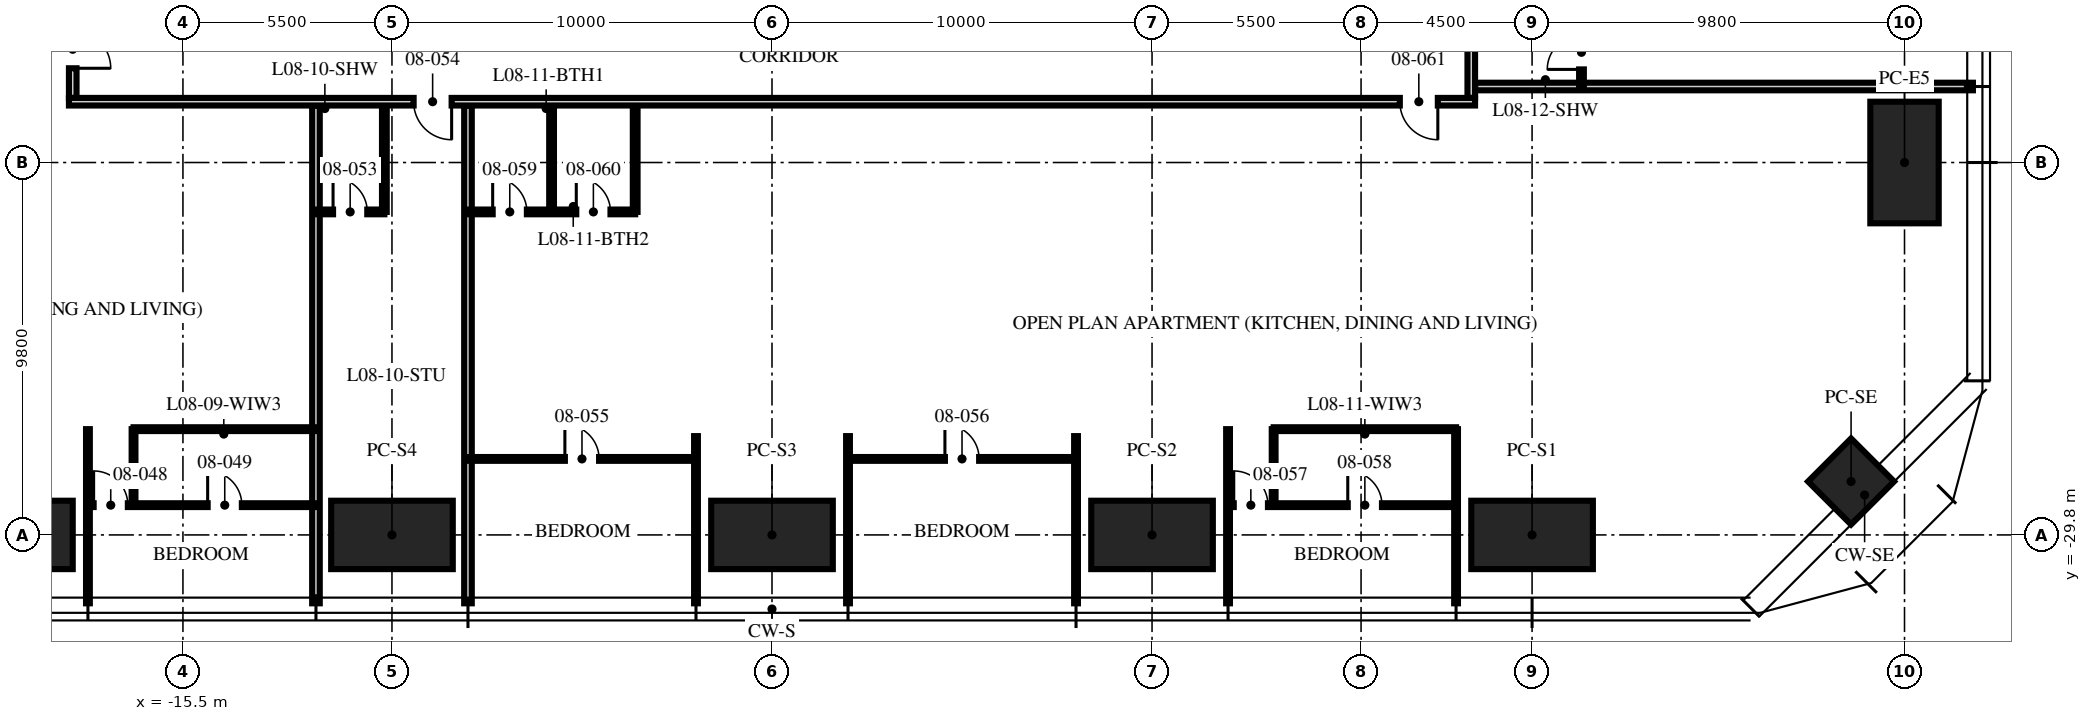
"""IFC4 building model, lengths in metres.
Left out: names, types, materials, properties, quantities, classifications, styles, units other than length and angle.
Written with IfcOpenShell. Run it as: python <this file> out.ifc"""

import sys

from ifc_helpers import new_model, si_unit, direction, frame, frame_2d, origin, origin_2d, place, context, subcontext, project, spatial, rectangle, hollow_rectangle, extrude, element, fill, save


model = new_model("IFC4")
c1 = context("Model", 3, precision=1e-05, world=origin(), true_north=direction((0.0, 1.0)))
c2 = subcontext(c1, "Body", "Model", "MODEL_VIEW")
j1 = project(units=[si_unit("LENGTHUNIT", "METRE"), si_unit("PLANEANGLEUNIT", "RADIAN")], contexts=[c1])
p1 = place(None, origin())
s1 = spatial("IfcSite", under=j1, at=p1, CompositionType="ELEMENT")
p2 = place(p1, origin())
s2 = spatial("IfcBuilding", under=s1, at=p2, CompositionType="ELEMENT")
p3 = place(p2, frame((0.0, 0.0, 36.0)))
s3 = spatial("IfcBuildingStorey", under=s2, at=p3, CompositionType="ELEMENT", Elevation=36.0)
for number, where, z_axis, x_axis in (
    (1, (29.8, -20.0, 0.0), (0.0, 0.0, 1.0), (0.0, 1.0, 0.0)),
    (2, (20.0, -29.8, 0.0), (0.0, 0.0, 1.0), (1.0, 0.0, 0.0)),
    (3, (10.0, -29.8, 0.0), (0.0, 0.0, 1.0), (1.0, 0.0, 0.0)),
    (4, (0.0, -29.8, 0.0), (0.0, 0.0, 1.0), (1.0, 0.0, 0.0)),
    (5, (-10.0, -29.8, 0.0), (0.0, 0.0, 1.0), (1.0, 0.0, 0.0)),
    (6, (-20.0, -29.8, 0.0), (0.0, 0.0, 1.0), (1.0, 0.0, 0.0)),
):
    element("IfcColumn", number, at=place(p3, frame(where, z_axis=z_axis, x_axis=x_axis)), inside=s3, PredefinedType="COLUMN", context=c2, shape_type="SweptSolid", body=[
        extrude(hollow_rectangle(XDim=3.2, YDim=1.8, WallThickness=0.2, at=origin_2d()), origin(), (0.0, 0.0, 1.0), 3.75),
    ])
p4 = place(p3, frame((28.394, -28.394, 0.0), z_axis=(0.0, 0.0, 1.0), x_axis=(0.707106781187, 0.707106781187, 0.0)))
e7 = element("IfcColumn", 7, at=p4, inside=s3, PredefinedType="COLUMN", context=c2, shape_type="SweptSolid", body=[
    extrude(hollow_rectangle(XDim=1.6, YDim=1.6, WallThickness=0.1, at=origin_2d()), origin(), (0.0, 0.0, 1.0), 3.75),
])
p5 = place(p3, frame((-18.0, -27.017, 0.0), z_axis=(0.0, 0.0, 1.0), x_axis=(0.0, -1.0, 0.0)))
e8 = element("IfcWall", 8, at=p5, inside=s3, PredefinedType="PARTITIONING", context=c2, shape_type="SweptSolid", body=[
    extrude(rectangle(XDim=4.583, YDim=0.1, at=frame_2d((2.292, 0.0))), origin(), (0.0, 0.0, 1.0), 2.71),
])
for number, where, z_axis, x_axis in (
    (9, (-12.0, -18.5, 0.0), (0.0, 0.0, 1.0), (0.0, -1.0, 0.0)),
    (10, (-8.0, -18.5, 0.0), (0.0, 0.0, 1.0), (0.0, -1.0, 0.0)),
):
    element("IfcWall", number, at=place(p3, frame(where, z_axis=z_axis, x_axis=x_axis)), inside=s3, PredefinedType="PARTITIONING", context=c2, shape_type="SweptSolid", body=[
        extrude(rectangle(XDim=13.1, YDim=0.2, at=frame_2d((6.55, 0.0))), origin(), (0.0, 0.0, 1.0), 2.71),
    ])
for number, where, z_axis, x_axis in (
    (11, (-2.0, -27.2, 0.0), (0.0, 0.0, 1.0), (0.0, -1.0, 0.0)),
    (12, (2.0, -27.2, 0.0), (0.0, 0.0, 1.0), (0.0, -1.0, 0.0)),
    (13, (8.0, -27.2, 0.0), (0.0, 0.0, 1.0), (0.0, -1.0, 0.0)),
):
    element("IfcWall", number, at=place(p3, frame(where, z_axis=z_axis, x_axis=x_axis)), inside=s3, PredefinedType="PARTITIONING", context=c2, shape_type="SweptSolid", body=[
        extrude(rectangle(XDim=4.4, YDim=0.1, at=frame_2d((2.2, 0.0))), origin(), (0.0, 0.0, 1.0), 2.71),
    ])
for number, where, z_axis, x_axis in (
    (14, (12.0, -27.017, 0.0), (0.0, 0.0, 1.0), (0.0, -1.0, 0.0)),
    (15, (18.0, -27.017, 0.0), (0.0, 0.0, 1.0), (0.0, -1.0, 0.0)),
):
    element("IfcWall", number, at=place(p3, frame(where, z_axis=z_axis, x_axis=x_axis)), inside=s3, PredefinedType="PARTITIONING", context=c2, shape_type="SweptSolid", body=[
        extrude(rectangle(XDim=4.583, YDim=0.1, at=frame_2d((2.292, 0.0))), origin(), (0.0, 0.0, 1.0), 2.71),
    ])
p6 = place(p3, frame((18.5, -18.0, 0.0), z_axis=(0.0, 0.0, 1.0), x_axis=(1.0, 0.0, 0.0)))
e16 = element("IfcWall", 16, at=p6, inside=s3, PredefinedType="PARTITIONING", context=c2, shape_type="SweptSolid", body=[
    extrude(rectangle(XDim=13.1, YDim=0.2, at=frame_2d((6.55, 0.0))), origin(), (0.0, 0.0, 1.0), 2.3),
])
p7 = place(p3, frame((-18.0, -29.017, 0.0), z_axis=(0.0, 0.0, 1.0), x_axis=(1.0, 0.0, 0.0)))
e17 = element("IfcWall", 17, at=p7, inside=s3, PredefinedType="PARTITIONING", context=c2, shape_type="SweptSolid", body=[
    extrude(rectangle(XDim=6.0, YDim=0.1, at=frame_2d((3.0, 0.0))), origin(), (0.0, 0.0, 1.0), 2.61),
])
p8 = place(p7, frame((0.15, 0.0, 0.0)))
e18 = element("IfcOpeningElement", 18, at=p8, cuts=e17, PredefinedType="OPENING", context=c2, shape_type="SweptSolid", body=[
    extrude(rectangle(XDim=0.9, YDim=2.1, at=frame_2d((0.45, 1.05))), frame((0.0, 0.06, 0.0), z_axis=(0.0, -1.0, 0.0), x_axis=(1.0, 0.0, 0.0)), (0.0, 0.0, 1.0), 0.12),
])
p9 = place(p7, frame((3.15, 0.0, 0.0)))
e19 = element("IfcOpeningElement", 19, at=p9, cuts=e17, PredefinedType="OPENING", context=c2, shape_type="SweptSolid", body=[
    extrude(rectangle(XDim=0.9, YDim=2.1, at=frame_2d((0.45, 1.05))), frame((0.0, 0.06, 0.0), z_axis=(0.0, -1.0, 0.0), x_axis=(1.0, 0.0, 0.0)), (0.0, 0.0, 1.0), 0.12),
])
p10 = place(p3, frame((-16.8, -27.017, 0.0), z_axis=(0.0, 0.0, 1.0), x_axis=(0.0, -1.0, 0.0)))
e20 = element("IfcWall", 20, at=p10, inside=s3, PredefinedType="PARTITIONING", context=c2, shape_type="SweptSolid", body=[
    extrude(rectangle(XDim=2.0, YDim=0.1, at=frame_2d((1.0, 0.0))), origin(), (0.0, 0.0, 1.0), 3.5),
])
p11 = place(p3, frame((-16.8, -27.017, 0.0), z_axis=(0.0, 0.0, 1.0), x_axis=(1.0, 0.0, 0.0)))
e21 = element("IfcWall", 21, at=p11, inside=s3, PredefinedType="PARTITIONING", context=c2, shape_type="SweptSolid", body=[
    extrude(rectangle(XDim=4.8, YDim=0.1, at=frame_2d((2.4, 0.0))), origin(), (0.0, 0.0, 1.0), 2.61),
])
p12 = place(p3, frame((-12.0, -21.3, 0.0), z_axis=(0.0, 0.0, 1.0), x_axis=(1.0, 0.0, 0.0)))
e22 = element("IfcWall", 22, at=p12, inside=s3, PredefinedType="PARTITIONING", context=c2, shape_type="SweptSolid", body=[
    extrude(rectangle(XDim=1.8, YDim=0.125, at=frame_2d((0.9, 0.0))), origin(), (0.0, 0.0, 1.0), 3.5),
])
p13 = place(p12, frame((0.45, 0.0, 0.0)))
e23 = element("IfcOpeningElement", 23, at=p13, cuts=e22, PredefinedType="OPENING", context=c2, shape_type="SweptSolid", body=[
    extrude(rectangle(XDim=0.9, YDim=2.1, at=frame_2d((0.45, 1.05))), frame((0.0, 0.073, 0.0), z_axis=(0.0, -1.0, 0.0), x_axis=(1.0, 0.0, 0.0)), (0.0, 0.0, 1.0), 0.145),
])
p14 = place(p3, frame((-10.2, -18.5, 0.0), z_axis=(0.0, 0.0, 1.0), x_axis=(0.0, -1.0, 0.0)))
e24 = element("IfcWall", 24, at=p14, inside=s3, PredefinedType="PARTITIONING", context=c2, shape_type="SweptSolid", body=[
    extrude(rectangle(XDim=2.8, YDim=0.125, at=frame_2d((1.4, 0.0))), origin(), (0.0, 0.0, 1.0), 2.492),
])
p15 = place(p3, frame((-8.0, -27.8, 0.0), z_axis=(0.0, 0.0, 1.0), x_axis=(1.0, 0.0, 0.0)))
e25 = element("IfcWall", 25, at=p15, inside=s3, PredefinedType="PARTITIONING", context=c2, shape_type="SweptSolid", body=[
    extrude(rectangle(XDim=6.0, YDim=0.1, at=frame_2d((3.0, 0.0))), origin(), (0.0, 0.0, 1.0), 2.61),
])
p16 = place(p15, frame((2.55, 0.0, 0.0)))
e26 = element("IfcOpeningElement", 26, at=p16, cuts=e25, PredefinedType="OPENING", context=c2, shape_type="SweptSolid", body=[
    extrude(rectangle(XDim=0.9, YDim=2.1, at=frame_2d((0.45, 1.05))), frame((0.0, 0.06, 0.0), z_axis=(0.0, -1.0, 0.0), x_axis=(1.0, 0.0, 0.0)), (0.0, 0.0, 1.0), 0.12),
])
p17 = place(p3, frame((2.0, -27.8, 0.0), z_axis=(0.0, 0.0, 1.0), x_axis=(1.0, 0.0, 0.0)))
e27 = element("IfcWall", 27, at=p17, inside=s3, PredefinedType="PARTITIONING", context=c2, shape_type="SweptSolid", body=[
    extrude(rectangle(XDim=6.0, YDim=0.1, at=frame_2d((3.0, 0.0))), origin(), (0.0, 0.0, 1.0), 2.61),
])
p18 = place(p17, frame((2.55, 0.0, 0.0)))
e28 = element("IfcOpeningElement", 28, at=p18, cuts=e27, PredefinedType="OPENING", context=c2, shape_type="SweptSolid", body=[
    extrude(rectangle(XDim=0.9, YDim=2.1, at=frame_2d((0.45, 1.05))), frame((0.0, 0.06, 0.0), z_axis=(0.0, -1.0, 0.0), x_axis=(1.0, 0.0, 0.0)), (0.0, 0.0, 1.0), 0.12),
])
p19 = place(p3, frame((12.0, -29.017, 0.0), z_axis=(0.0, 0.0, 1.0), x_axis=(1.0, 0.0, 0.0)))
e29 = element("IfcWall", 29, at=p19, inside=s3, PredefinedType="PARTITIONING", context=c2, shape_type="SweptSolid", body=[
    extrude(rectangle(XDim=6.0, YDim=0.1, at=frame_2d((3.0, 0.0))), origin(), (0.0, 0.0, 1.0), 2.61),
])
p20 = place(p19, frame((0.15, 0.0, 0.0)))
e30 = element("IfcOpeningElement", 30, at=p20, cuts=e29, PredefinedType="OPENING", context=c2, shape_type="SweptSolid", body=[
    extrude(rectangle(XDim=0.9, YDim=2.1, at=frame_2d((0.45, 1.05))), frame((0.0, 0.06, 0.0), z_axis=(0.0, -1.0, 0.0), x_axis=(1.0, 0.0, 0.0)), (0.0, 0.0, 1.0), 0.12),
])
p21 = place(p19, frame((3.15, 0.0, 0.0)))
e31 = element("IfcOpeningElement", 31, at=p21, cuts=e29, PredefinedType="OPENING", context=c2, shape_type="SweptSolid", body=[
    extrude(rectangle(XDim=0.9, YDim=2.1, at=frame_2d((0.45, 1.05))), frame((0.0, 0.06, 0.0), z_axis=(0.0, -1.0, 0.0), x_axis=(1.0, 0.0, 0.0)), (0.0, 0.0, 1.0), 0.12),
])
p22 = place(p3, frame((13.2, -27.017, 0.0), z_axis=(0.0, 0.0, 1.0), x_axis=(0.0, -1.0, 0.0)))
e32 = element("IfcWall", 32, at=p22, inside=s3, PredefinedType="PARTITIONING", context=c2, shape_type="SweptSolid", body=[
    extrude(rectangle(XDim=2.0, YDim=0.1, at=frame_2d((1.0, 0.0))), origin(), (0.0, 0.0, 1.0), 3.5),
])
p23 = place(p3, frame((13.2, -27.017, 0.0), z_axis=(0.0, 0.0, 1.0), x_axis=(1.0, 0.0, 0.0)))
e33 = element("IfcWall", 33, at=p23, inside=s3, PredefinedType="PARTITIONING", context=c2, shape_type="SweptSolid", body=[
    extrude(rectangle(XDim=4.8, YDim=0.1, at=frame_2d((2.4, 0.0))), origin(), (0.0, 0.0, 1.0), 2.61),
])
p24 = place(p3, frame((-8.0, -21.3, 0.0), z_axis=(0.0, 0.0, 1.0), x_axis=(1.0, 0.0, 0.0)))
e34 = element("IfcWall", 34, at=p24, inside=s3, PredefinedType="PARTITIONING", context=c2, shape_type="SweptSolid", body=[
    extrude(rectangle(XDim=4.4, YDim=0.125, at=frame_2d((2.2, 0.0))), origin(), (0.0, 0.0, 1.0), 2.61),
])
p25 = place(p24, frame((0.65, 0.0, 0.0)))
e35 = element("IfcOpeningElement", 35, at=p25, cuts=e34, PredefinedType="OPENING", context=c2, shape_type="SweptSolid", body=[
    extrude(rectangle(XDim=0.9, YDim=2.1, at=frame_2d((0.45, 1.05))), frame((0.0, 0.073, 0.0), z_axis=(0.0, -1.0, 0.0), x_axis=(1.0, 0.0, 0.0)), (0.0, 0.0, 1.0), 0.145),
])
p26 = place(p24, frame((2.85, 0.0, 0.0)))
e36 = element("IfcOpeningElement", 36, at=p26, cuts=e34, PredefinedType="OPENING", context=c2, shape_type="SweptSolid", body=[
    extrude(rectangle(XDim=0.9, YDim=2.1, at=frame_2d((0.45, 1.05))), frame((0.0, 0.073, 0.0), z_axis=(0.0, -1.0, 0.0), x_axis=(1.0, 0.0, 0.0)), (0.0, 0.0, 1.0), 0.145),
])
for number, where, z_axis, x_axis in (
    (37, (-5.8, -18.5, 0.0), (0.0, 0.0, 1.0), (0.0, -1.0, 0.0)),
    (38, (-3.6, -18.5, 0.0), (0.0, 0.0, 1.0), (0.0, -1.0, 0.0)),
):
    element("IfcWall", number, at=place(p3, frame(where, z_axis=z_axis, x_axis=x_axis)), inside=s3, PredefinedType="PARTITIONING", context=c2, shape_type="SweptSolid", body=[
        extrude(rectangle(XDim=2.8, YDim=0.125, at=frame_2d((1.4, 0.0))), origin(), (0.0, 0.0, 1.0), 3.5),
    ])
p27 = place(p3, frame((21.3, -18.0, 0.0), z_axis=(0.0, 0.0, 1.0), x_axis=(0.0, 1.0, 0.0)))
e39 = element("IfcWall", 39, at=p27, inside=s3, PredefinedType="PARTITIONING", context=c2, shape_type="SweptSolid", body=[
    extrude(rectangle(XDim=1.8, YDim=0.125, at=frame_2d((0.9, 0.0))), origin(), (0.0, 0.0, 1.0), 3.5),
])
p28 = place(p27, frame((0.45, 0.0, 0.0)))
e40 = element("IfcOpeningElement", 40, at=p28, cuts=e39, PredefinedType="OPENING", context=c2, shape_type="SweptSolid", body=[
    extrude(rectangle(XDim=0.9, YDim=2.1, at=frame_2d((0.45, 1.05))), frame((0.0, 0.073, 0.0), z_axis=(0.0, -1.0, 0.0), x_axis=(1.0, 0.0, 0.0)), (0.0, 0.0, 1.0), 0.145),
])
p29 = place(p3, frame((18.4, -18.3, 0.0), z_axis=(0.0, 0.0, 1.0), x_axis=(0.0, 1.0, 0.0)))
e41 = element("IfcWall", 41, at=p29, inside=s3, PredefinedType="PARTITIONING", context=c2, shape_type="SweptSolid", body=[
    extrude(rectangle(XDim=4.3, YDim=0.2, at=frame_2d((2.15, 0.0))), origin(), (0.0, 0.0, 1.0), 2.3),
])
p30 = place(p3, frame((-18.4, 18.3, 0.0), z_axis=(0.0, 0.0, 1.0), x_axis=(0.0, -1.0, 0.0)))
e42 = element("IfcWall", 42, at=p30, inside=s3, PredefinedType="PARTITIONING", context=c2, shape_type="SweptSolid", body=[
    extrude(rectangle(XDim=36.6, YDim=0.2, at=frame_2d((18.3, 0.0))), origin(), (0.0, 0.0, 1.0), 2.3),
])
p31 = place(p30, frame((8.7, 0.0, 0.0)))
e43 = element("IfcOpeningElement", 43, at=p31, cuts=e42, PredefinedType="OPENING", context=c2, shape_type="SweptSolid", body=[
    extrude(rectangle(XDim=1.0, YDim=2.2, at=frame_2d((0.5, 1.1))), frame((0.0, 0.11, 0.0), z_axis=(0.0, -1.0, 0.0), x_axis=(1.0, 0.0, 0.0)), (0.0, 0.0, 1.0), 0.22),
])
p32 = place(p30, frame((14.87, 0.0, 0.0)))
e44 = element("IfcOpeningElement", 44, at=p32, cuts=e42, PredefinedType="OPENING", context=c2, shape_type="SweptSolid", body=[
    extrude(rectangle(XDim=1.0, YDim=2.2, at=frame_2d((0.5, 1.1))), frame((0.0, 0.11, 0.0), z_axis=(0.0, -1.0, 0.0), x_axis=(1.0, 0.0, 0.0)), (0.0, 0.0, 1.0), 0.22),
])
p33 = place(p30, frame((34.82, 0.0, 0.0)))
e45 = element("IfcOpeningElement", 45, at=p33, cuts=e42, PredefinedType="OPENING", context=c2, shape_type="SweptSolid", body=[
    extrude(rectangle(XDim=1.0, YDim=2.2, at=frame_2d((0.5, 1.1))), frame((0.0, 0.11, 0.0), z_axis=(0.0, -1.0, 0.0), x_axis=(1.0, 0.0, 0.0)), (0.0, 0.0, 1.0), 0.22),
])
p34 = place(p3, frame((18.5, -18.4, 0.0), z_axis=(0.0, 0.0, 1.0), x_axis=(-1.0, 0.0, 0.0)))
e46 = element("IfcWall", 46, at=p34, inside=s3, PredefinedType="PARTITIONING", context=c2, shape_type="SweptSolid", body=[
    extrude(rectangle(XDim=37.0, YDim=0.2, at=frame_2d((18.5, 0.0))), origin(), (0.0, 0.0, 1.0), 2.3),
])
p35 = place(p34, frame((26.93, 0.0, 0.0)))
e47 = element("IfcOpeningElement", 47, at=p35, cuts=e46, PredefinedType="OPENING", context=c2, shape_type="SweptSolid", body=[
    extrude(rectangle(XDim=1.0, YDim=2.2, at=frame_2d((0.5, 1.1))), frame((0.0, 0.11, 0.0), z_axis=(0.0, -1.0, 0.0), x_axis=(1.0, 0.0, 0.0)), (0.0, 0.0, 1.0), 0.22),
])
p36 = place(p34, frame((0.98, 0.0, 0.0)))
e48 = element("IfcOpeningElement", 48, at=p36, cuts=e46, PredefinedType="OPENING", context=c2, shape_type="SweptSolid", body=[
    extrude(rectangle(XDim=1.0, YDim=2.2, at=frame_2d((0.5, 1.1))), frame((0.0, 0.11, 0.0), z_axis=(0.0, -1.0, 0.0), x_axis=(1.0, 0.0, 0.0)), (0.0, 0.0, 1.0), 0.22),
])
p37 = place(p8, origin())
e49 = element("IfcDoor", 49, at=p37, inside=s3, OperationType="SINGLE_SWING_LEFT", PredefinedType="DOOR", context=c2, shape_type="SweptSolid", body=[
    extrude(rectangle(XDim=0.9, YDim=2.1, at=frame_2d((0.45, 1.05))), frame((0.0, 0.025, 0.0), z_axis=(0.0, -1.0, 0.0), x_axis=(1.0, 0.0, 0.0)), (0.0, 0.0, 1.0), 0.05),
])
fill(e18, e49)
p38 = place(p9, origin())
e50 = element("IfcDoor", 50, at=p38, inside=s3, OperationType="SINGLE_SWING_LEFT", PredefinedType="DOOR", context=c2, shape_type="SweptSolid", body=[
    extrude(rectangle(XDim=0.9, YDim=2.1, at=frame_2d((0.45, 1.05))), frame((0.0, 0.025, 0.0), z_axis=(0.0, -1.0, 0.0), x_axis=(1.0, 0.0, 0.0)), (0.0, 0.0, 1.0), 0.05),
])
fill(e19, e50)
p39 = place(p33, origin())
e51 = element("IfcDoor", 51, at=p39, inside=s3, OperationType="SINGLE_SWING_RIGHT", PredefinedType="DOOR", context=c2, shape_type="SweptSolid", body=[
    extrude(rectangle(XDim=1.0, YDim=2.2, at=frame_2d((0.5, 1.1))), frame((0.0, 0.025, 0.0), z_axis=(0.0, -1.0, 0.0), x_axis=(1.0, 0.0, 0.0)), (0.0, 0.0, 1.0), 0.05),
])
fill(e45, e51)
p40 = place(p13, origin())
e52 = element("IfcDoor", 52, at=p40, inside=s3, OperationType="SINGLE_SWING_LEFT", PredefinedType="DOOR", context=c2, shape_type="SweptSolid", body=[
    extrude(rectangle(XDim=0.9, YDim=2.1, at=frame_2d((0.45, 1.05))), frame((0.0, 0.025, 0.0), z_axis=(0.0, -1.0, 0.0), x_axis=(1.0, 0.0, 0.0)), (0.0, 0.0, 1.0), 0.05),
])
fill(e23, e52)
p41 = place(p35, origin())
e53 = element("IfcDoor", 53, at=p41, inside=s3, OperationType="SINGLE_SWING_LEFT", PredefinedType="DOOR", context=c2, shape_type="SweptSolid", body=[
    extrude(rectangle(XDim=1.0, YDim=2.2, at=frame_2d((0.5, 1.1))), frame((0.0, 0.025, 0.0), z_axis=(0.0, -1.0, 0.0), x_axis=(1.0, 0.0, 0.0)), (0.0, 0.0, 1.0), 0.05),
])
fill(e47, e53)
p42 = place(p16, origin())
e54 = element("IfcDoor", 54, at=p42, inside=s3, OperationType="SINGLE_SWING_LEFT", PredefinedType="DOOR", context=c2, shape_type="SweptSolid", body=[
    extrude(rectangle(XDim=0.9, YDim=2.1, at=frame_2d((0.45, 1.05))), frame((0.0, 0.025, 0.0), z_axis=(0.0, -1.0, 0.0), x_axis=(1.0, 0.0, 0.0)), (0.0, 0.0, 1.0), 0.05),
])
fill(e26, e54)
p43 = place(p18, origin())
e55 = element("IfcDoor", 55, at=p43, inside=s3, OperationType="SINGLE_SWING_LEFT", PredefinedType="DOOR", context=c2, shape_type="SweptSolid", body=[
    extrude(rectangle(XDim=0.9, YDim=2.1, at=frame_2d((0.45, 1.05))), frame((0.0, 0.025, 0.0), z_axis=(0.0, -1.0, 0.0), x_axis=(1.0, 0.0, 0.0)), (0.0, 0.0, 1.0), 0.05),
])
fill(e28, e55)
p44 = place(p20, origin())
e56 = element("IfcDoor", 56, at=p44, inside=s3, OperationType="SINGLE_SWING_LEFT", PredefinedType="DOOR", context=c2, shape_type="SweptSolid", body=[
    extrude(rectangle(XDim=0.9, YDim=2.1, at=frame_2d((0.45, 1.05))), frame((0.0, 0.025, 0.0), z_axis=(0.0, -1.0, 0.0), x_axis=(1.0, 0.0, 0.0)), (0.0, 0.0, 1.0), 0.05),
])
fill(e30, e56)
p45 = place(p21, origin())
e57 = element("IfcDoor", 57, at=p45, inside=s3, OperationType="SINGLE_SWING_LEFT", PredefinedType="DOOR", context=c2, shape_type="SweptSolid", body=[
    extrude(rectangle(XDim=0.9, YDim=2.1, at=frame_2d((0.45, 1.05))), frame((0.0, 0.025, 0.0), z_axis=(0.0, -1.0, 0.0), x_axis=(1.0, 0.0, 0.0)), (0.0, 0.0, 1.0), 0.05),
])
fill(e31, e57)
p46 = place(p25, origin())
e58 = element("IfcDoor", 58, at=p46, inside=s3, OperationType="SINGLE_SWING_LEFT", PredefinedType="DOOR", context=c2, shape_type="SweptSolid", body=[
    extrude(rectangle(XDim=0.9, YDim=2.1, at=frame_2d((0.45, 1.05))), frame((0.0, 0.025, 0.0), z_axis=(0.0, -1.0, 0.0), x_axis=(1.0, 0.0, 0.0)), (0.0, 0.0, 1.0), 0.05),
])
fill(e35, e58)
p47 = place(p26, origin())
e59 = element("IfcDoor", 59, at=p47, inside=s3, OperationType="SINGLE_SWING_LEFT", PredefinedType="DOOR", context=c2, shape_type="SweptSolid", body=[
    extrude(rectangle(XDim=0.9, YDim=2.1, at=frame_2d((0.45, 1.05))), frame((0.0, 0.025, 0.0), z_axis=(0.0, -1.0, 0.0), x_axis=(1.0, 0.0, 0.0)), (0.0, 0.0, 1.0), 0.05),
])
fill(e36, e59)
p48 = place(p36, origin())
e60 = element("IfcDoor", 60, at=p48, inside=s3, OperationType="SINGLE_SWING_LEFT", PredefinedType="DOOR", context=c2, shape_type="SweptSolid", body=[
    extrude(rectangle(XDim=1.0, YDim=2.2, at=frame_2d((0.5, 1.1))), frame((0.0, 0.025, 0.0), z_axis=(0.0, -1.0, 0.0), x_axis=(1.0, 0.0, 0.0)), (0.0, 0.0, 1.0), 0.05),
])
fill(e48, e60)
p49 = place(p28, origin())
e61 = element("IfcDoor", 61, at=p49, inside=s3, OperationType="SINGLE_SWING_LEFT", PredefinedType="DOOR", context=c2, shape_type="SweptSolid", body=[
    extrude(rectangle(XDim=0.9, YDim=2.1, at=frame_2d((0.45, 1.05))), frame((0.0, 0.025, 0.0), z_axis=(0.0, -1.0, 0.0), x_axis=(1.0, 0.0, 0.0)), (0.0, 0.0, 1.0), 0.05),
])
fill(e40, e61)
save(model, sys.argv[1])
